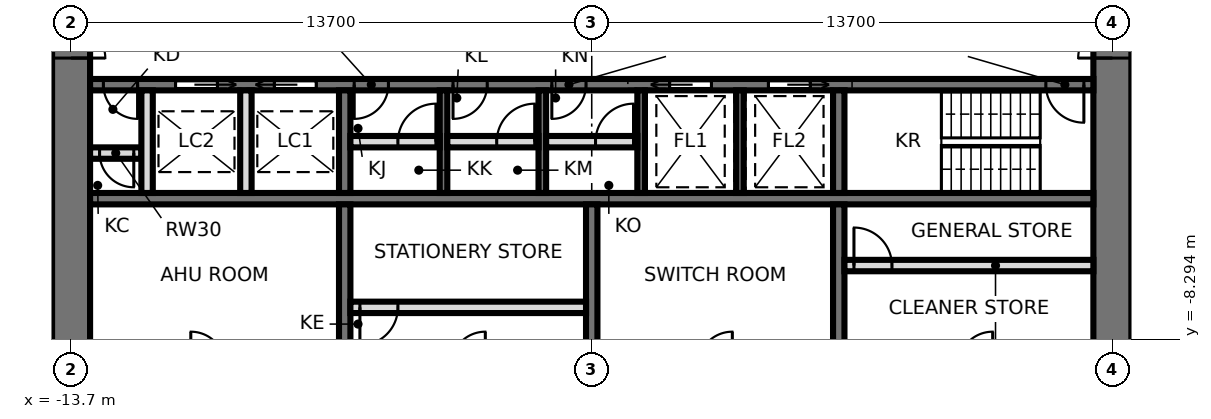
"""IFC4 building model, lengths in metres.
Left out: names, types, materials, properties, quantities, classifications, styles, units other than length and angle.
Written with IfcOpenShell. Run it as: python <this file> out.ifc"""

import sys

from ifc_helpers import new_model, si_unit, direction, frame, frame_2d, origin, place, context, subcontext, project, spatial, rectangle, extrude, element, fill, save


model = new_model("IFC4")
c1 = context("Model", 3, precision=1e-05, world=origin(), true_north=direction((0.0, 1.0)))
c2 = subcontext(c1, "Body", "Model", "MODEL_VIEW")
j1 = project(units=[si_unit("LENGTHUNIT", "METRE"), si_unit("PLANEANGLEUNIT", "RADIAN")], contexts=[c1])
p1 = place(None, origin())
s1 = spatial("IfcSite", under=j1, at=p1, CompositionType="ELEMENT")
p2 = place(p1, origin())
s2 = spatial("IfcBuilding", under=s1, at=p2, CompositionType="ELEMENT")
p3 = place(p2, frame((0.0, 0.0, 211.1)))
s3 = spatial("IfcBuildingStorey", under=s2, at=p3, CompositionType="ELEMENT", Elevation=211.1)
p4 = place(p3, frame((13.7, -9.5, 0.0), z_axis=(0.0, 0.0, 1.0), x_axis=(0.0, 1.0, 0.0)))
e1 = element("IfcWall", 1, at=p4, inside=s3, PredefinedType="SHEAR", context=c2, shape_type="SweptSolid", body=[
    extrude(rectangle(XDim=19.0, YDim=1.0, at=frame_2d((9.5, 0.0))), origin(), (0.0, 0.0, 1.0), 3.9),
])
p5 = place(p4, frame((8.6, 0.0, 0.0)))
e2 = element("IfcOpeningElement", 2, at=p5, cuts=e1, PredefinedType="OPENING", context=c2, shape_type="SweptSolid", body=[
    extrude(rectangle(XDim=1.8, YDim=2.4, at=frame_2d((0.9, 1.2))), frame((0.0, 0.51, 0.0), z_axis=(0.0, -1.0, 0.0), x_axis=(1.0, 0.0, 0.0)), (0.0, 0.0, 1.0), 1.02),
])
p6 = place(p3, frame((-13.7, 9.5, 0.0), z_axis=(0.0, 0.0, 1.0), x_axis=(0.0, -1.0, 0.0)))
e3 = element("IfcWall", 3, at=p6, inside=s3, PredefinedType="SHEAR", context=c2, shape_type="SweptSolid", body=[
    extrude(rectangle(XDim=19.0, YDim=1.0, at=frame_2d((9.5, 0.0))), origin(), (0.0, 0.0, 1.0), 3.9),
])
p7 = place(p6, frame((8.6, 0.0, 0.0)))
e4 = element("IfcOpeningElement", 4, at=p7, cuts=e3, PredefinedType="OPENING", context=c2, shape_type="SweptSolid", body=[
    extrude(rectangle(XDim=1.8, YDim=2.4, at=frame_2d((0.9, 1.2))), frame((0.0, 0.51, 0.0), z_axis=(0.0, -1.0, 0.0), x_axis=(1.0, 0.0, 0.0)), (0.0, 0.0, 1.0), 1.02),
])
p8 = place(p3, frame((-13.2, -1.6, 0.0), z_axis=(0.0, 0.0, 1.0), x_axis=(1.0, 0.0, 0.0)))
e5 = element("IfcWall", 5, at=p8, inside=s3, PredefinedType="SHEAR", context=c2, shape_type="SweptSolid", body=[
    extrude(rectangle(XDim=26.4, YDim=0.3, at=frame_2d((13.2, 0.0))), origin(), (0.0, 0.0, 1.0), 3.9),
])
p9 = place(p8, frame((25.15, 0.0, 0.0)))
e6 = element("IfcOpeningElement", 6, at=p9, cuts=e5, PredefinedType="OPENING", context=c2, shape_type="SweptSolid", body=[
    extrude(rectangle(XDim=1.0, YDim=2.1, at=frame_2d((0.5, 1.05))), frame((0.0, 0.16, 0.0), z_axis=(0.0, -1.0, 0.0), x_axis=(1.0, 0.0, 0.0)), (0.0, 0.0, 1.0), 0.32),
])
p10 = place(p8, frame((6.95, 0.0, 0.0)))
e7 = element("IfcOpeningElement", 7, at=p10, cuts=e5, PredefinedType="OPENING", context=c2, shape_type="SweptSolid", body=[
    extrude(rectangle(XDim=0.9, YDim=2.1, at=frame_2d((0.45, 1.05))), frame((0.0, 0.16, 0.0), z_axis=(0.0, -1.0, 0.0), x_axis=(1.0, 0.0, 0.0)), (0.0, 0.0, 1.0), 0.32),
])
p11 = place(p8, frame((9.55, 0.0, 0.0)))
e8 = element("IfcOpeningElement", 8, at=p11, cuts=e5, PredefinedType="OPENING", context=c2, shape_type="SweptSolid", body=[
    extrude(rectangle(XDim=0.9, YDim=2.1, at=frame_2d((0.45, 1.05))), frame((0.0, 0.16, 0.0), z_axis=(0.0, -1.0, 0.0), x_axis=(1.0, 0.0, 0.0)), (0.0, 0.0, 1.0), 0.32),
])
p12 = place(p8, frame((12.15, 0.0, 0.0)))
e9 = element("IfcOpeningElement", 9, at=p12, cuts=e5, PredefinedType="OPENING", context=c2, shape_type="SweptSolid", body=[
    extrude(rectangle(XDim=0.9, YDim=2.1, at=frame_2d((0.45, 1.05))), frame((0.0, 0.16, 0.0), z_axis=(0.0, -1.0, 0.0), x_axis=(1.0, 0.0, 0.0)), (0.0, 0.0, 1.0), 0.32),
])
p13 = place(p8, frame((15.25, 0.0, 0.0)))
e10 = element("IfcOpeningElement", 10, at=p13, cuts=e5, PredefinedType="OPENING", context=c2, shape_type="SweptSolid", body=[
    extrude(rectangle(XDim=1.1, YDim=2.3, at=frame_2d((0.55, 1.15))), frame((0.0, 0.16, 0.0), z_axis=(0.0, -1.0, 0.0), x_axis=(1.0, 0.0, 0.0)), (0.0, 0.0, 1.0), 0.32),
])
p14 = place(p8, frame((17.85, 0.0, 0.0)))
e11 = element("IfcOpeningElement", 11, at=p14, cuts=e5, PredefinedType="OPENING", context=c2, shape_type="SweptSolid", body=[
    extrude(rectangle(XDim=1.1, YDim=2.3, at=frame_2d((0.55, 1.15))), frame((0.0, 0.16, 0.0), z_axis=(0.0, -1.0, 0.0), x_axis=(1.0, 0.0, 0.0)), (0.0, 0.0, 1.0), 0.32),
])
p15 = place(p8, frame((4.85, 0.0, 0.0)))
e12 = element("IfcOpeningElement", 12, at=p15, cuts=e5, PredefinedType="OPENING", context=c2, shape_type="SweptSolid", body=[
    extrude(rectangle(XDim=1.1, YDim=2.3, at=frame_2d((0.55, 1.15))), frame((0.0, 0.16, 0.0), z_axis=(0.0, -1.0, 0.0), x_axis=(1.0, 0.0, 0.0)), (0.0, 0.0, 1.0), 0.32),
])
p16 = place(p8, frame((2.25, 0.0, 0.0)))
e13 = element("IfcOpeningElement", 13, at=p16, cuts=e5, PredefinedType="OPENING", context=c2, shape_type="SweptSolid", body=[
    extrude(rectangle(XDim=1.1, YDim=2.3, at=frame_2d((0.55, 1.15))), frame((0.0, 0.16, 0.0), z_axis=(0.0, -1.0, 0.0), x_axis=(1.0, 0.0, 0.0)), (0.0, 0.0, 1.0), 0.32),
])
p17 = place(p8, frame((0.35, 0.0, 0.0)))
e14 = element("IfcOpeningElement", 14, at=p17, cuts=e5, PredefinedType="OPENING", context=c2, shape_type="SweptSolid", body=[
    extrude(rectangle(XDim=0.9, YDim=2.1, at=frame_2d((0.45, 1.05))), frame((0.0, 0.16, 0.0), z_axis=(0.0, -1.0, 0.0), x_axis=(1.0, 0.0, 0.0)), (0.0, 0.0, 1.0), 0.32),
])
p18 = place(p3, frame((-13.2, -4.6, 0.0), z_axis=(0.0, 0.0, 1.0), x_axis=(1.0, 0.0, 0.0)))
e15 = element("IfcWall", 15, at=p18, inside=s3, PredefinedType="SHEAR", context=c2, shape_type="SweptSolid", body=[
    extrude(rectangle(XDim=26.4, YDim=0.3, at=frame_2d((13.2, 0.0))), origin(), (0.0, 0.0, 1.0), 3.9),
])
p19 = place(p3, frame((-6.5, -1.75, 0.0), z_axis=(0.0, 0.0, 1.0), x_axis=(0.0, -1.0, 0.0)))
e16 = element("IfcWall", 16, at=p19, inside=s3, PredefinedType="SHEAR", context=c2, shape_type="SweptSolid", body=[
    extrude(rectangle(XDim=2.7, YDim=0.3, at=frame_2d((1.35, 0.0))), origin(), (0.0, 0.0, 1.0), 3.9),
])
p20 = place(p3, frame((-6.5, -4.75, 0.0), z_axis=(0.0, 0.0, 1.0), x_axis=(0.0, -1.0, 0.0)))
e17 = element("IfcWall", 17, at=p20, inside=s3, PredefinedType="SHEAR", context=c2, shape_type="SweptSolid", body=[
    extrude(rectangle(XDim=3.75, YDim=0.3, at=frame_2d((1.875, 0.0))), origin(), (0.0, 0.0, 1.0), 3.9),
])
p21 = place(p3, frame((6.5, -1.75, 0.0), z_axis=(0.0, 0.0, 1.0), x_axis=(0.0, -1.0, 0.0)))
e18 = element("IfcWall", 18, at=p21, inside=s3, PredefinedType="SHEAR", context=c2, shape_type="SweptSolid", body=[
    extrude(rectangle(XDim=2.7, YDim=0.3, at=frame_2d((1.35, 0.0))), origin(), (0.0, 0.0, 1.0), 3.9),
])
p22 = place(p3, frame((6.5, -4.75, 0.0), z_axis=(0.0, 0.0, 1.0), x_axis=(0.0, -1.0, 0.0)))
e19 = element("IfcWall", 19, at=p22, inside=s3, PredefinedType="SHEAR", context=c2, shape_type="SweptSolid", body=[
    extrude(rectangle(XDim=3.75, YDim=0.3, at=frame_2d((1.875, 0.0))), origin(), (0.0, 0.0, 1.0), 3.9),
])
for number, where, z_axis, x_axis in (
    (20, (-3.9, -1.75, 0.0), (0.0, 0.0, 1.0), (0.0, -1.0, 0.0)),
    (21, (-1.3, -1.75, 0.0), (0.0, 0.0, 1.0), (0.0, -1.0, 0.0)),
    (22, (1.3, -1.75, 0.0), (0.0, 0.0, 1.0), (0.0, -1.0, 0.0)),
    (23, (3.9, -1.75, 0.0), (0.0, 0.0, 1.0), (0.0, -1.0, 0.0)),
):
    element("IfcWall", number, at=place(p3, frame(where, z_axis=z_axis, x_axis=x_axis)), inside=s3, PredefinedType="SHEAR", context=c2, shape_type="SweptSolid", body=[
        extrude(rectangle(XDim=2.7, YDim=0.2, at=frame_2d((1.35, 0.0))), origin(), (0.0, 0.0, 1.0), 3.9),
    ])
p23 = place(p3, frame((0.0, -4.75, 0.0), z_axis=(0.0, 0.0, 1.0), x_axis=(0.0, -1.0, 0.0)))
e24 = element("IfcWall", 24, at=p23, inside=s3, PredefinedType="SHEAR", context=c2, shape_type="SweptSolid", body=[
    extrude(rectangle(XDim=3.75, YDim=0.3, at=frame_2d((1.875, 0.0))), origin(), (0.0, 0.0, 1.0), 3.9),
])
p24 = place(p3, frame((-6.35, -3.1, 0.0), z_axis=(0.0, 0.0, 1.0), x_axis=(1.0, 0.0, 0.0)))
e25 = element("IfcWall", 25, at=p24, inside=s3, PredefinedType="PARTITIONING", context=c2, shape_type="SweptSolid", body=[
    extrude(rectangle(XDim=2.35, YDim=0.3, at=frame_2d((1.175, 0.0))), origin(), (0.0, 0.0, 1.0), 3.74),
])
p25 = place(p24, frame((1.25, 0.0, 0.0)))
e26 = element("IfcOpeningElement", 26, at=p25, cuts=e25, PredefinedType="OPENING", context=c2, shape_type="SweptSolid", body=[
    extrude(rectangle(XDim=1.0, YDim=2.4, at=frame_2d((0.5, 1.2))), frame((0.0, 0.16, 0.0), z_axis=(0.0, -1.0, 0.0), x_axis=(1.0, 0.0, 0.0)), (0.0, 0.0, 1.0), 0.32),
])
p26 = place(p3, frame((-3.8, -3.1, 0.0), z_axis=(0.0, 0.0, 1.0), x_axis=(1.0, 0.0, 0.0)))
e27 = element("IfcWall", 27, at=p26, inside=s3, PredefinedType="PARTITIONING", context=c2, shape_type="SweptSolid", body=[
    extrude(rectangle(XDim=2.4, YDim=0.3, at=frame_2d((1.2, 0.0))), origin(), (0.0, 0.0, 1.0), 3.74),
])
p27 = place(p26, frame((1.3, 0.0, 0.0)))
e28 = element("IfcOpeningElement", 28, at=p27, cuts=e27, PredefinedType="OPENING", context=c2, shape_type="SweptSolid", body=[
    extrude(rectangle(XDim=1.0, YDim=2.4, at=frame_2d((0.5, 1.2))), frame((0.0, 0.16, 0.0), z_axis=(0.0, -1.0, 0.0), x_axis=(1.0, 0.0, 0.0)), (0.0, 0.0, 1.0), 0.32),
])
p28 = place(p3, frame((-1.2, -3.1, 0.0), z_axis=(0.0, 0.0, 1.0), x_axis=(1.0, 0.0, 0.0)))
e29 = element("IfcWall", 29, at=p28, inside=s3, PredefinedType="PARTITIONING", context=c2, shape_type="SweptSolid", body=[
    extrude(rectangle(XDim=2.4, YDim=0.3, at=frame_2d((1.2, 0.0))), origin(), (0.0, 0.0, 1.0), 3.74),
])
p29 = place(p28, frame((1.3, 0.0, 0.0)))
e30 = element("IfcOpeningElement", 30, at=p29, cuts=e29, PredefinedType="OPENING", context=c2, shape_type="SweptSolid", body=[
    extrude(rectangle(XDim=1.0, YDim=2.4, at=frame_2d((0.5, 1.2))), frame((0.0, 0.16, 0.0), z_axis=(0.0, -1.0, 0.0), x_axis=(1.0, 0.0, 0.0)), (0.0, 0.0, 1.0), 0.32),
])
p30 = place(p3, frame((-6.35, -7.46, 0.0), z_axis=(0.0, 0.0, 1.0), x_axis=(1.0, 0.0, 0.0)))
e31 = element("IfcWall", 31, at=p30, inside=s3, PredefinedType="PARTITIONING", context=c2, shape_type="SweptSolid", body=[
    extrude(rectangle(XDim=6.2, YDim=0.3, at=frame_2d((3.1, 0.0))), origin(), (0.0, 0.0, 1.0), 3.74),
])
p31 = place(p30, frame((0.25, 0.0, 0.0)))
e32 = element("IfcOpeningElement", 32, at=p31, cuts=e31, PredefinedType="OPENING", context=c2, shape_type="SweptSolid", body=[
    extrude(rectangle(XDim=1.0, YDim=2.4, at=frame_2d((0.5, 1.2))), frame((0.0, 0.16, 0.0), z_axis=(0.0, -1.0, 0.0), x_axis=(1.0, 0.0, 0.0)), (0.0, 0.0, 1.0), 0.32),
])
p32 = place(p3, frame((6.65, -6.36, 0.0), z_axis=(0.0, 0.0, 1.0), x_axis=(1.0, 0.0, 0.0)))
e33 = element("IfcWall", 33, at=p32, inside=s3, PredefinedType="PARTITIONING", context=c2, shape_type="SweptSolid", body=[
    extrude(rectangle(XDim=6.55, YDim=0.3, at=frame_2d((3.275, 0.0))), origin(), (0.0, 0.0, 1.0), 3.74),
])
p33 = place(p32, frame((0.25, 0.0, 0.0)))
e34 = element("IfcOpeningElement", 34, at=p33, cuts=e33, PredefinedType="OPENING", context=c2, shape_type="SweptSolid", body=[
    extrude(rectangle(XDim=1.0, YDim=2.4, at=frame_2d((0.5, 1.2))), frame((0.0, 0.16, 0.0), z_axis=(0.0, -1.0, 0.0), x_axis=(1.0, 0.0, 0.0)), (0.0, 0.0, 1.0), 0.32),
])
p34 = place(p3, frame((-13.2, -3.4, 0.0), z_axis=(0.0, 0.0, 1.0), x_axis=(1.0, 0.0, 0.0)))
e35 = element("IfcWall", 35, at=p34, inside=s3, PredefinedType="SOLIDWALL", context=c2, shape_type="SweptSolid", body=[
    extrude(rectangle(XDim=1.35, YDim=0.3, at=frame_2d((0.675, 0.0))), origin(), (0.0, 0.0, 1.0), 3.74),
])
p35 = place(p34, frame((0.25, 0.0, 0.0)))
e36 = element("IfcOpeningElement", 36, at=p35, cuts=e35, PredefinedType="OPENING", context=c2, shape_type="SweptSolid", body=[
    extrude(rectangle(XDim=0.9, YDim=2.1, at=frame_2d((0.45, 1.05))), frame((0.0, 0.16, 0.0), z_axis=(0.0, -1.0, 0.0), x_axis=(1.0, 0.0, 0.0)), (0.0, 0.0, 1.0), 0.32),
])
for number, where, z_axis, x_axis in (
    (37, (-9.1, -1.75, 0.0), (0.0, 0.0, 1.0), (0.0, -1.0, 0.0)),
    (38, (-11.7, -1.75, 0.0), (0.0, 0.0, 1.0), (0.0, -1.0, 0.0)),
):
    element("IfcWall", number, at=place(p3, frame(where, z_axis=z_axis, x_axis=x_axis)), inside=s3, PredefinedType="SOLIDWALL", context=c2, shape_type="SweptSolid", body=[
        extrude(rectangle(XDim=2.7, YDim=0.3, at=frame_2d((1.35, 0.0))), origin(), (0.0, 0.0, 1.0), 3.74),
    ])
p36 = place(p7, origin())
e39 = element("IfcDoor", 39, at=p36, inside=s3, OperationType="DOUBLE_DOOR_SINGLE_SWING", PredefinedType="DOOR", context=c2, shape_type="SweptSolid", body=[
    extrude(rectangle(XDim=1.72, YDim=2.36, at=frame_2d((0.9, 1.18))), frame((0.0, 0.025, 0.0), z_axis=(0.0, -1.0, 0.0), x_axis=(1.0, 0.0, 0.0)), (0.0, 0.0, 1.0), 0.05),
    extrude(rectangle(XDim=0.04, YDim=2.4, at=frame_2d((0.02, 1.2))), frame((0.0, 0.25, 0.0), z_axis=(0.0, -1.0, 0.0), x_axis=(1.0, 0.0, 0.0)), (0.0, 0.0, 1.0), 0.5),
    extrude(rectangle(XDim=0.04, YDim=2.4, at=frame_2d((1.78, 1.2))), frame((0.0, 0.25, 0.0), z_axis=(0.0, -1.0, 0.0), x_axis=(1.0, 0.0, 0.0)), (0.0, 0.0, 1.0), 0.5),
    extrude(rectangle(XDim=1.72, YDim=0.04, at=frame_2d((0.9, 2.38))), frame((0.0, 0.25, 0.0), z_axis=(0.0, -1.0, 0.0), x_axis=(1.0, 0.0, 0.0)), (0.0, 0.0, 1.0), 0.5),
])
fill(e4, e39)
p37 = place(p5, origin())
e40 = element("IfcDoor", 40, at=p37, inside=s3, OperationType="DOUBLE_DOOR_SINGLE_SWING", PredefinedType="DOOR", context=c2, shape_type="SweptSolid", body=[
    extrude(rectangle(XDim=1.72, YDim=2.36, at=frame_2d((0.9, 1.18))), frame((0.0, 0.025, 0.0), z_axis=(0.0, -1.0, 0.0), x_axis=(1.0, 0.0, 0.0)), (0.0, 0.0, 1.0), 0.05),
    extrude(rectangle(XDim=0.04, YDim=2.4, at=frame_2d((0.02, 1.2))), frame((0.0, 0.25, 0.0), z_axis=(0.0, -1.0, 0.0), x_axis=(1.0, 0.0, 0.0)), (0.0, 0.0, 1.0), 0.5),
    extrude(rectangle(XDim=0.04, YDim=2.4, at=frame_2d((1.78, 1.2))), frame((0.0, 0.25, 0.0), z_axis=(0.0, -1.0, 0.0), x_axis=(1.0, 0.0, 0.0)), (0.0, 0.0, 1.0), 0.5),
    extrude(rectangle(XDim=1.72, YDim=0.04, at=frame_2d((0.9, 2.38))), frame((0.0, 0.25, 0.0), z_axis=(0.0, -1.0, 0.0), x_axis=(1.0, 0.0, 0.0)), (0.0, 0.0, 1.0), 0.5),
])
fill(e2, e40)
p38 = place(p9, frame((1.0, 0.0, 0.0), z_axis=(0.0, 0.0, 1.0), x_axis=(-1.0, 0.0, 0.0)))
e41 = element("IfcDoor", 41, at=p38, inside=s3, OperationType="SINGLE_SWING_LEFT", PredefinedType="DOOR", context=c2, shape_type="SweptSolid", body=[
    extrude(rectangle(XDim=1.0, YDim=2.1, at=frame_2d((0.5, 1.05))), frame((0.0, 0.025, 0.0), z_axis=(0.0, -1.0, 0.0), x_axis=(1.0, 0.0, 0.0)), (0.0, 0.0, 1.0), 0.05),
])
fill(e6, e41)
p39 = place(p25, origin())
e42 = element("IfcDoor", 42, at=p39, inside=s3, OperationType="SINGLE_SWING_RIGHT", PredefinedType="DOOR", context=c2, shape_type="SweptSolid", body=[
    extrude(rectangle(XDim=1.0, YDim=2.4, at=frame_2d((0.5, 1.2))), frame((0.0, 0.025, 0.0), z_axis=(0.0, -1.0, 0.0), x_axis=(1.0, 0.0, 0.0)), (0.0, 0.0, 1.0), 0.05),
])
fill(e26, e42)
p40 = place(p10, frame((0.9, 0.0, 0.0), z_axis=(0.0, 0.0, 1.0), x_axis=(-1.0, 0.0, 0.0)))
e43 = element("IfcDoor", 43, at=p40, inside=s3, OperationType="SINGLE_SWING_RIGHT", PredefinedType="DOOR", context=c2, shape_type="SweptSolid", body=[
    extrude(rectangle(XDim=0.9, YDim=2.1, at=frame_2d((0.45, 1.05))), frame((0.0, 0.025, 0.0), z_axis=(0.0, -1.0, 0.0), x_axis=(1.0, 0.0, 0.0)), (0.0, 0.0, 1.0), 0.05),
])
fill(e7, e43)
p41 = place(p27, origin())
e44 = element("IfcDoor", 44, at=p41, inside=s3, OperationType="SINGLE_SWING_RIGHT", PredefinedType="DOOR", context=c2, shape_type="SweptSolid", body=[
    extrude(rectangle(XDim=1.0, YDim=2.4, at=frame_2d((0.5, 1.2))), frame((0.0, 0.025, 0.0), z_axis=(0.0, -1.0, 0.0), x_axis=(1.0, 0.0, 0.0)), (0.0, 0.0, 1.0), 0.05),
])
fill(e28, e44)
p42 = place(p11, frame((0.9, 0.0, 0.0), z_axis=(0.0, 0.0, 1.0), x_axis=(-1.0, 0.0, 0.0)))
e45 = element("IfcDoor", 45, at=p42, inside=s3, OperationType="SINGLE_SWING_RIGHT", PredefinedType="DOOR", context=c2, shape_type="SweptSolid", body=[
    extrude(rectangle(XDim=0.9, YDim=2.1, at=frame_2d((0.45, 1.05))), frame((0.0, 0.025, 0.0), z_axis=(0.0, -1.0, 0.0), x_axis=(1.0, 0.0, 0.0)), (0.0, 0.0, 1.0), 0.05),
])
fill(e8, e45)
p43 = place(p29, origin())
e46 = element("IfcDoor", 46, at=p43, inside=s3, OperationType="SINGLE_SWING_RIGHT", PredefinedType="DOOR", context=c2, shape_type="SweptSolid", body=[
    extrude(rectangle(XDim=1.0, YDim=2.4, at=frame_2d((0.5, 1.2))), frame((0.0, 0.025, 0.0), z_axis=(0.0, -1.0, 0.0), x_axis=(1.0, 0.0, 0.0)), (0.0, 0.0, 1.0), 0.05),
])
fill(e30, e46)
p44 = place(p12, frame((0.9, 0.0, 0.0), z_axis=(0.0, 0.0, 1.0), x_axis=(-1.0, 0.0, 0.0)))
e47 = element("IfcDoor", 47, at=p44, inside=s3, OperationType="SINGLE_SWING_RIGHT", PredefinedType="DOOR", context=c2, shape_type="SweptSolid", body=[
    extrude(rectangle(XDim=0.9, YDim=2.1, at=frame_2d((0.45, 1.05))), frame((0.0, 0.025, 0.0), z_axis=(0.0, -1.0, 0.0), x_axis=(1.0, 0.0, 0.0)), (0.0, 0.0, 1.0), 0.05),
])
fill(e9, e47)
p45 = place(p13, frame((1.1, 0.0, 0.0), z_axis=(0.0, 0.0, 1.0), x_axis=(-1.0, 0.0, 0.0)))
e48 = element("IfcDoor", 48, at=p45, inside=s3, OperationType="SLIDING_TO_RIGHT", PredefinedType="DOOR", context=c2, shape_type="SweptSolid", body=[
    extrude(rectangle(XDim=1.1, YDim=2.3, at=frame_2d((0.55, 1.15))), frame((0.0, 0.025, 0.0), z_axis=(0.0, -1.0, 0.0), x_axis=(1.0, 0.0, 0.0)), (0.0, 0.0, 1.0), 0.05),
])
fill(e10, e48)
p46 = place(p14, frame((1.1, 0.0, 0.0), z_axis=(0.0, 0.0, 1.0), x_axis=(-1.0, 0.0, 0.0)))
e49 = element("IfcDoor", 49, at=p46, inside=s3, OperationType="SLIDING_TO_LEFT", PredefinedType="DOOR", context=c2, shape_type="SweptSolid", body=[
    extrude(rectangle(XDim=1.1, YDim=2.3, at=frame_2d((0.55, 1.15))), frame((0.0, 0.025, 0.0), z_axis=(0.0, -1.0, 0.0), x_axis=(1.0, 0.0, 0.0)), (0.0, 0.0, 1.0), 0.05),
])
fill(e11, e49)
p47 = place(p15, frame((1.1, 0.0, 0.0), z_axis=(0.0, 0.0, 1.0), x_axis=(-1.0, 0.0, 0.0)))
e50 = element("IfcDoor", 50, at=p47, inside=s3, OperationType="SLIDING_TO_RIGHT", PredefinedType="DOOR", context=c2, shape_type="SweptSolid", body=[
    extrude(rectangle(XDim=1.1, YDim=2.3, at=frame_2d((0.55, 1.15))), frame((0.0, 0.025, 0.0), z_axis=(0.0, -1.0, 0.0), x_axis=(1.0, 0.0, 0.0)), (0.0, 0.0, 1.0), 0.05),
])
fill(e12, e50)
p48 = place(p16, frame((1.1, 0.0, 0.0), z_axis=(0.0, 0.0, 1.0), x_axis=(-1.0, 0.0, 0.0)))
e51 = element("IfcDoor", 51, at=p48, inside=s3, OperationType="SLIDING_TO_LEFT", PredefinedType="DOOR", context=c2, shape_type="SweptSolid", body=[
    extrude(rectangle(XDim=1.1, YDim=2.3, at=frame_2d((0.55, 1.15))), frame((0.0, 0.025, 0.0), z_axis=(0.0, -1.0, 0.0), x_axis=(1.0, 0.0, 0.0)), (0.0, 0.0, 1.0), 0.05),
])
fill(e13, e51)
p49 = place(p17, frame((0.9, 0.0, 0.0), z_axis=(0.0, 0.0, 1.0), x_axis=(-1.0, 0.0, 0.0)))
e52 = element("IfcDoor", 52, at=p49, inside=s3, OperationType="SINGLE_SWING_LEFT", PredefinedType="DOOR", context=c2, shape_type="SweptSolid", body=[
    extrude(rectangle(XDim=0.9, YDim=2.1, at=frame_2d((0.45, 1.05))), frame((0.0, 0.025, 0.0), z_axis=(0.0, -1.0, 0.0), x_axis=(1.0, 0.0, 0.0)), (0.0, 0.0, 1.0), 0.05),
])
fill(e14, e52)
p50 = place(p31, frame((1.0, 0.0, 0.0), z_axis=(0.0, 0.0, 1.0), x_axis=(-1.0, 0.0, 0.0)))
e53 = element("IfcDoor", 53, at=p50, inside=s3, OperationType="SINGLE_SWING_RIGHT", PredefinedType="DOOR", context=c2, shape_type="SweptSolid", body=[
    extrude(rectangle(XDim=1.0, YDim=2.4, at=frame_2d((0.5, 1.2))), frame((0.0, 0.025, 0.0), z_axis=(0.0, -1.0, 0.0), x_axis=(1.0, 0.0, 0.0)), (0.0, 0.0, 1.0), 0.05),
])
fill(e32, e53)
p51 = place(p33, origin())
e54 = element("IfcDoor", 54, at=p51, inside=s3, OperationType="SINGLE_SWING_LEFT", PredefinedType="DOOR", context=c2, shape_type="SweptSolid", body=[
    extrude(rectangle(XDim=1.0, YDim=2.4, at=frame_2d((0.5, 1.2))), frame((0.0, 0.025, 0.0), z_axis=(0.0, -1.0, 0.0), x_axis=(1.0, 0.0, 0.0)), (0.0, 0.0, 1.0), 0.05),
])
fill(e34, e54)
p52 = place(p35, frame((0.9, 0.0, 0.0), z_axis=(0.0, 0.0, 1.0), x_axis=(-1.0, 0.0, 0.0)))
e55 = element("IfcDoor", 55, at=p52, inside=s3, OperationType="SINGLE_SWING_LEFT", PredefinedType="DOOR", context=c2, shape_type="SweptSolid", body=[
    extrude(rectangle(XDim=0.9, YDim=2.1, at=frame_2d((0.45, 1.05))), frame((0.0, 0.025, 0.0), z_axis=(0.0, -1.0, 0.0), x_axis=(1.0, 0.0, 0.0)), (0.0, 0.0, 1.0), 0.05),
])
fill(e36, e55)
save(model, sys.argv[1])
